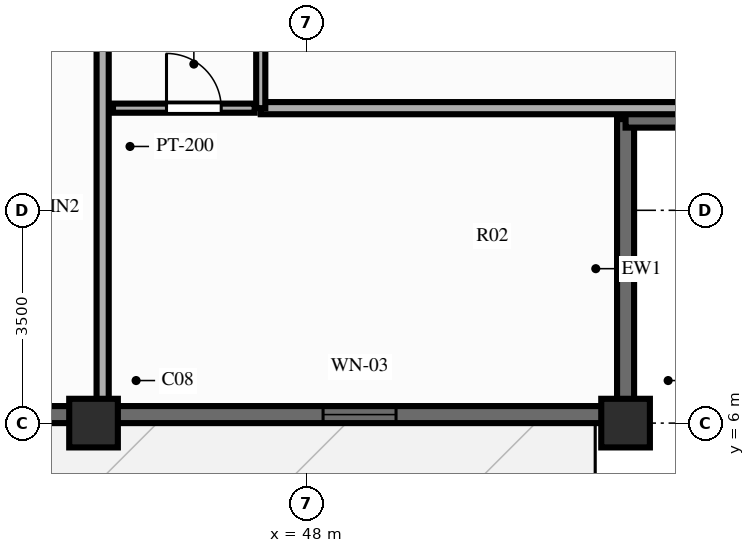
"""IFC4 building model, lengths in metres.
Left out: names, types, materials, properties, quantities, classifications, styles, units other than length and angle.
Written with IfcOpenShell. Run it as: python <this file> out.ifc"""

import sys

from ifc_helpers import new_model, si_unit, direction, frame, frame_2d, origin, origin_2d, place, context, subcontext, project, spatial, rectangle, extrude, source, transform, mapped, element, fill, save


model = new_model("IFC4")
c1 = context("Model", 3, precision=1e-05, world=origin(), true_north=direction((0.0, 1.0)))
c2 = subcontext(c1, "Body", "Model", "MODEL_VIEW")
j1 = project(units=[si_unit("LENGTHUNIT", "METRE"), si_unit("PLANEANGLEUNIT", "RADIAN")], contexts=[c1])
p1 = place(None, origin())
s1 = spatial("IfcSite", under=j1, at=p1, CompositionType="ELEMENT")
p2 = place(p1, origin())
s2 = spatial("IfcBuilding", under=s1, at=p2, CompositionType="ELEMENT")
p3 = place(p2, frame((0.0, 0.0, 192.7)))
s3 = spatial("IfcBuildingStorey", under=s2, at=p3, CompositionType="ELEMENT", Elevation=192.7)
m1 = source(origin(), c2, "Body", "SweptSolid", [
    extrude(rectangle(XDim=0.8, YDim=0.8, at=origin_2d()), origin(), (0.0, 0.0, 1.0), 3.9),
])
for number, where, z_axis, x_axis in (
    (1, (44.5, 6.0, 0.0), (0.0, 0.0, 1.0), (1.0, 0.0, 0.0)),
    (2, (53.25, 6.0, 0.0), (0.0, 0.0, 1.0), (1.0, 0.0, 0.0)),
):
    element("IfcColumn", number, at=place(p3, frame(where, z_axis=z_axis, x_axis=x_axis)), inside=s3, PredefinedType="COLUMN", context=c2, shape_type="MappedRepresentation", body=[
        mapped(m1, transform((0.0, 0.0, 0.0), scale=1.0)),
    ])
p4 = place(p3, frame((22.75, 6.14, 0.0), z_axis=(0.0, 0.0, 1.0), x_axis=(1.0, 0.0, 0.0)))
e3 = element("IfcWall", 3, at=p4, inside=s3, PredefinedType="SOLIDWALL", context=c2, shape_type="SweptSolid", body=[
    extrude(rectangle(XDim=30.5, YDim=0.28, at=frame_2d((15.25, 0.0))), origin(), (0.0, 0.0, 1.0), 2.44),
])
p5 = place(p4, frame((4.925, 0.0, 0.0), z_axis=(0.0, 0.0, 1.0), x_axis=(-1.0, 0.0, 0.0)))
e4 = element("IfcOpeningElement", 4, at=p5, cuts=e3, PredefinedType="OPENING", context=c2, shape_type="SweptSolid", body=[
    extrude(rectangle(XDim=1.1, YDim=2.15, at=frame_2d((0.55, 1.075))), frame((0.0, 0.152, 0.0), z_axis=(0.0, -1.0, 0.0), x_axis=(1.0, 0.0, 0.0)), (0.0, 0.0, 1.0), 0.304),
])
p6 = place(p4, frame((11.387, 0.0, 0.25)))
e5 = element("IfcOpeningElement", 5, at=p6, cuts=e3, PredefinedType="OPENING", context=c2, shape_type="SweptSolid", body=[
    extrude(rectangle(XDim=1.2, YDim=1.5, at=frame_2d((0.6, 0.75))), frame((0.0, 0.152, 0.0), z_axis=(0.0, -1.0, 0.0), x_axis=(1.0, 0.0, 0.0)), (0.0, 0.0, 1.0), 0.304),
])
p7 = place(p4, frame((15.484, 0.0, 0.25)))
e6 = element("IfcOpeningElement", 6, at=p7, cuts=e3, PredefinedType="OPENING", context=c2, shape_type="SweptSolid", body=[
    extrude(rectangle(XDim=1.2, YDim=1.5, at=frame_2d((0.6, 0.75))), frame((0.0, 0.152, 0.0), z_axis=(0.0, -1.0, 0.0), x_axis=(1.0, 0.0, 0.0)), (0.0, 0.0, 1.0), 0.304),
])
p8 = place(p4, frame((17.628, 0.0, 0.25)))
e7 = element("IfcOpeningElement", 7, at=p8, cuts=e3, PredefinedType="OPENING", context=c2, shape_type="SweptSolid", body=[
    extrude(rectangle(XDim=1.2, YDim=1.5, at=frame_2d((0.6, 0.75))), frame((0.0, 0.152, 0.0), z_axis=(0.0, -1.0, 0.0), x_axis=(1.0, 0.0, 0.0)), (0.0, 0.0, 1.0), 0.304),
])
p9 = place(p4, frame((19.791, 0.0, 0.25)))
e8 = element("IfcOpeningElement", 8, at=p9, cuts=e3, PredefinedType="OPENING", context=c2, shape_type="SweptSolid", body=[
    extrude(rectangle(XDim=1.2, YDim=1.5, at=frame_2d((0.6, 0.75))), frame((0.0, 0.152, 0.0), z_axis=(0.0, -1.0, 0.0), x_axis=(1.0, 0.0, 0.0)), (0.0, 0.0, 1.0), 0.304),
])
p10 = place(p4, frame((25.525, 0.0, 0.25)))
e9 = element("IfcOpeningElement", 9, at=p10, cuts=e3, PredefinedType="OPENING", context=c2, shape_type="SweptSolid", body=[
    extrude(rectangle(XDim=1.2, YDim=1.5, at=frame_2d((0.6, 0.75))), frame((0.0, 0.152, 0.0), z_axis=(0.0, -1.0, 0.0), x_axis=(1.0, 0.0, 0.0)), (0.0, 0.0, 1.0), 0.304),
])
for number, where, z_axis, x_axis in (
    (10, (53.25, 6.08, 0.0), (0.0, 0.0, 1.0), (0.0, 1.0, 0.0)),
    (11, (53.25, 11.0, 0.0), (0.0, 0.0, 1.0), (1.0, 0.0, 0.0)),
):
    element("IfcWall", number, at=place(p3, frame(where, z_axis=z_axis, x_axis=x_axis)), inside=s3, PredefinedType="SOLIDWALL", context=c2, shape_type="SweptSolid", body=[
        extrude(rectangle(XDim=4.92, YDim=0.28, at=frame_2d((2.46, 0.0))), origin(), (0.0, 0.0, 1.0), 2.44),
    ])
p11 = place(p3, frame((44.82, 11.18, 0.0), z_axis=(0.0, 0.0, 1.0), x_axis=(1.0, 0.0, 0.0)))
e12 = element("IfcWall", 12, at=p11, inside=s3, PredefinedType="PARTITIONING", context=c2, shape_type="SweptSolid", body=[
    extrude(rectangle(XDim=2.33, YDim=0.15, at=frame_2d((1.165, 0.0))), origin(), (0.0, 0.0, 1.0), 2.24),
])
p12 = place(p11, frame((0.88, 0.0, 0.0)))
e13 = element("IfcOpeningElement", 13, at=p12, cuts=e12, PredefinedType="OPENING", context=c2, shape_type="SweptSolid", body=[
    extrude(rectangle(XDim=0.9, YDim=2.1, at=frame_2d((0.45, 1.05))), frame((0.0, 0.087, 0.0), z_axis=(0.0, -1.0, 0.0), x_axis=(1.0, 0.0, 0.0)), (0.0, 0.0, 1.0), 0.174),
])
p13 = place(p3, frame((44.65, 14.95, 0.0), z_axis=(0.0, 0.0, 1.0), x_axis=(0.0, -1.0, 0.0)))
e14 = element("IfcWall", 14, at=p13, inside=s3, PredefinedType="PARTITIONING", context=c2, shape_type="SweptSolid", body=[
    extrude(rectangle(XDim=8.8, YDim=0.2, at=frame_2d((4.4, 0.0))), origin(), (0.0, 0.0, 1.0), 2.44),
])
p14 = place(p3, frame((47.25, 11.18, 0.0), z_axis=(0.0, 0.0, 1.0), x_axis=(1.0, 0.0, 0.0)))
e15 = element("IfcWall", 15, at=p14, inside=s3, PredefinedType="PARTITIONING", context=c2, shape_type="SweptSolid", body=[
    extrude(rectangle(XDim=10.85, YDim=0.2, at=frame_2d((5.425, 0.0))), origin(), (0.0, 0.0, 1.0), 2.24),
])
p15 = place(p3, frame((47.25, 11.18, 0.0), z_axis=(0.0, 0.0, 1.0), x_axis=(0.0, 1.0, 0.0)))
e16 = element("IfcWall", 16, at=p15, inside=s3, PredefinedType="PARTITIONING", context=c2, shape_type="SweptSolid", body=[
    extrude(rectangle(XDim=7.91, YDim=0.15, at=frame_2d((3.955, 0.0))), origin(), (0.0, 0.0, 1.0), 3.56),
])
p16 = place(p15, frame((3.405, 0.0, 0.0)))
e17 = element("IfcOpeningElement", 17, at=p16, cuts=e16, PredefinedType="OPENING", context=c2, shape_type="SweptSolid", body=[
    extrude(rectangle(XDim=1.1, YDim=2.15, at=frame_2d((0.55, 1.075))), frame((0.0, 0.087, 0.0), z_axis=(0.0, -1.0, 0.0), x_axis=(1.0, 0.0, 0.0)), (0.0, 0.0, 1.0), 0.174),
])
m2 = source(origin(), c2, "Body", "SweptSolid", [
    extrude(rectangle(XDim=1.2, YDim=1.5, at=frame_2d((0.6, 0.75))), frame((0.0, 0.03, 0.0), z_axis=(0.0, -1.0, 0.0), x_axis=(1.0, 0.0, 0.0)), (0.0, 0.0, 1.0), 0.06),
])
p17 = place(p10, origin())
e18 = element("IfcWindow", 18, at=p17, inside=s3, PartitioningType="SINGLE_PANEL", PredefinedType="WINDOW", context=c2, shape_type="MappedRepresentation", body=[
    mapped(m2, transform((0.0, 0.0, 0.0), scale=1.0)),
])
fill(e9, e18)
m3 = source(origin(), c2, "Body", "SweptSolid", [
    extrude(rectangle(XDim=0.9, YDim=2.1, at=frame_2d((0.45, 1.05))), frame((0.0, 0.025, 0.0), z_axis=(0.0, -1.0, 0.0), x_axis=(1.0, 0.0, 0.0)), (0.0, 0.0, 1.0), 0.05),
])
p18 = place(p12, origin())
e19 = element("IfcDoor", 19, at=p18, inside=s3, OperationType="SINGLE_SWING_LEFT", PredefinedType="DOOR", context=c2, shape_type="MappedRepresentation", body=[
    mapped(m3, transform((0.0, 0.0, 0.0), scale=1.0)),
])
fill(e13, e19)
save(model, sys.argv[1])
